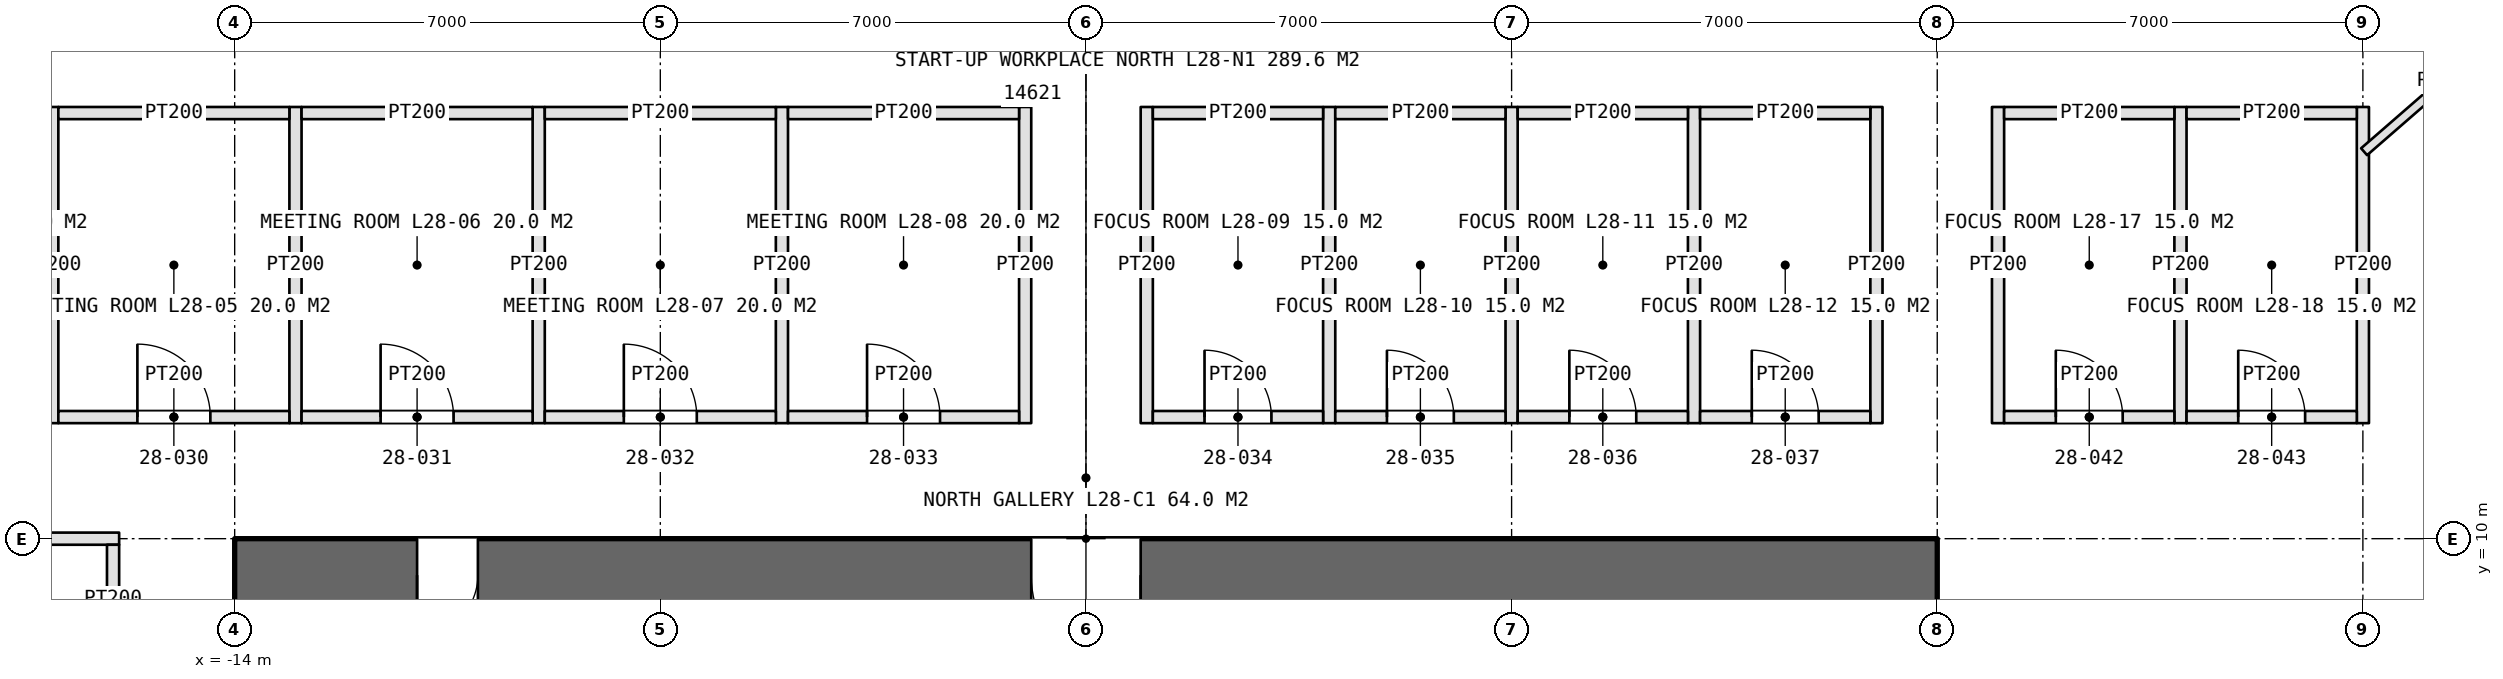
"""IFC4 building model, lengths in metres.
Left out: names, types, materials, properties, quantities, classifications, styles, units other than length and angle.
Written with IfcOpenShell. Run it as: python <this file> out.ifc"""

import sys

from ifc_helpers import new_model, si_unit, direction, frame, frame_2d, origin, place, context, subcontext, project, spatial, rectangle, extrude, element, fill, save


model = new_model("IFC4")
c1 = context("Model", 3, precision=1e-05, world=origin(), true_north=direction((0.0, 1.0)))
c2 = subcontext(c1, "Body", "Model", "MODEL_VIEW")
j1 = project(units=[si_unit("LENGTHUNIT", "METRE"), si_unit("PLANEANGLEUNIT", "RADIAN")], contexts=[c1])
p1 = place(None, origin())
s1 = spatial("IfcSite", under=j1, at=p1, CompositionType="ELEMENT")
p2 = place(p1, origin())
s2 = spatial("IfcBuilding", under=s1, at=p2, CompositionType="ELEMENT")
p3 = place(p2, frame((0.0, 0.0, 134.4)))
s3 = spatial("IfcBuildingStorey", under=s2, at=p3, CompositionType="ELEMENT", Elevation=134.4)
p4 = place(p3, frame((14.0, 9.4, 0.0), z_axis=(0.0, 0.0, 1.0), x_axis=(-1.0, 0.0, 0.0)))
e1 = element("IfcWall", 1, at=p4, inside=s3, PredefinedType="SHEAR", context=c2, shape_type="SweptSolid", body=[
    extrude(rectangle(XDim=28.0, YDim=1.2, at=frame_2d((14.0, 0.0))), origin(), (0.0, 0.0, 1.0), 4.2),
])
p5 = place(p4, frame((24.0, 0.0, 0.0)))
e2 = element("IfcOpeningElement", 2, at=p5, cuts=e1, PredefinedType="OPENING", context=c2, shape_type="SweptSolid", body=[
    extrude(rectangle(XDim=1.0, YDim=2.4, at=frame_2d((0.5, 1.2))), frame((0.0, 0.61, 0.0), z_axis=(0.0, -1.0, 0.0), x_axis=(1.0, 0.0, 0.0)), (0.0, 0.0, 1.0), 1.22),
])
p6 = place(p4, frame((13.1, 0.0, 0.0)))
e3 = element("IfcOpeningElement", 3, at=p6, cuts=e1, PredefinedType="OPENING", context=c2, shape_type="SweptSolid", body=[
    extrude(rectangle(XDim=1.8, YDim=2.4, at=frame_2d((0.9, 1.2))), frame((0.0, 0.61, 0.0), z_axis=(0.0, -1.0, 0.0), x_axis=(1.0, 0.0, 0.0)), (0.0, 0.0, 1.0), 1.22),
])
for number, where, z_axis, x_axis in (
    (4, (-17.0, 11.9, 0.0), (0.0, 0.0, 1.0), (0.0, 1.0, 0.0)),
    (5, (-13.0, 11.9, 0.0), (0.0, 0.0, 1.0), (0.0, 1.0, 0.0)),
    (6, (-9.0, 11.9, 0.0), (0.0, 0.0, 1.0), (0.0, 1.0, 0.0)),
    (7, (-5.0, 11.9, 0.0), (0.0, 0.0, 1.0), (0.0, 1.0, 0.0)),
    (8, (-1.0, 11.9, 0.0), (0.0, 0.0, 1.0), (0.0, 1.0, 0.0)),
):
    element("IfcWall", number, at=place(p3, frame(where, z_axis=z_axis, x_axis=x_axis)), inside=s3, PredefinedType="PARTITIONING", context=c2, shape_type="SweptSolid", body=[
        extrude(rectangle(XDim=5.2, YDim=0.2, at=frame_2d((2.6, 0.0))), origin(), (0.0, 0.0, 1.0), 3.0),
    ])
p7 = place(p3, frame((-16.9, 12.0, 0.0), z_axis=(0.0, 0.0, 1.0), x_axis=(1.0, 0.0, 0.0)))
e9 = element("IfcWall", 9, at=p7, inside=s3, PredefinedType="PARTITIONING", context=c2, shape_type="SweptSolid", body=[
    extrude(rectangle(XDim=3.8, YDim=0.2, at=frame_2d((1.9, 0.0))), origin(), (0.0, 0.0, 1.0), 3.0),
])
p8 = place(p7, frame((1.3, 0.0, 0.0)))
e10 = element("IfcOpeningElement", 10, at=p8, cuts=e9, PredefinedType="OPENING", context=c2, shape_type="SweptSolid", body=[
    extrude(rectangle(XDim=1.2, YDim=2.4, at=frame_2d((0.6, 1.2))), frame((0.0, 0.11, 0.0), z_axis=(0.0, -1.0, 0.0), x_axis=(1.0, 0.0, 0.0)), (0.0, 0.0, 1.0), 0.22),
])
p9 = place(p3, frame((-16.9, 17.0, 0.0), z_axis=(0.0, 0.0, 1.0), x_axis=(1.0, 0.0, 0.0)))
e11 = element("IfcWall", 11, at=p9, inside=s3, PredefinedType="PARTITIONING", context=c2, shape_type="SweptSolid", body=[
    extrude(rectangle(XDim=3.8, YDim=0.2, at=frame_2d((1.9, 0.0))), origin(), (0.0, 0.0, 1.0), 3.0),
])
p10 = place(p3, frame((-12.9, 12.0, 0.0), z_axis=(0.0, 0.0, 1.0), x_axis=(1.0, 0.0, 0.0)))
e12 = element("IfcWall", 12, at=p10, inside=s3, PredefinedType="PARTITIONING", context=c2, shape_type="SweptSolid", body=[
    extrude(rectangle(XDim=3.8, YDim=0.2, at=frame_2d((1.9, 0.0))), origin(), (0.0, 0.0, 1.0), 3.0),
])
p11 = place(p10, frame((1.3, 0.0, 0.0)))
e13 = element("IfcOpeningElement", 13, at=p11, cuts=e12, PredefinedType="OPENING", context=c2, shape_type="SweptSolid", body=[
    extrude(rectangle(XDim=1.2, YDim=2.4, at=frame_2d((0.6, 1.2))), frame((0.0, 0.11, 0.0), z_axis=(0.0, -1.0, 0.0), x_axis=(1.0, 0.0, 0.0)), (0.0, 0.0, 1.0), 0.22),
])
p12 = place(p3, frame((-12.9, 17.0, 0.0), z_axis=(0.0, 0.0, 1.0), x_axis=(1.0, 0.0, 0.0)))
e14 = element("IfcWall", 14, at=p12, inside=s3, PredefinedType="PARTITIONING", context=c2, shape_type="SweptSolid", body=[
    extrude(rectangle(XDim=3.8, YDim=0.2, at=frame_2d((1.9, 0.0))), origin(), (0.0, 0.0, 1.0), 3.0),
])
p13 = place(p3, frame((-8.9, 12.0, 0.0), z_axis=(0.0, 0.0, 1.0), x_axis=(1.0, 0.0, 0.0)))
e15 = element("IfcWall", 15, at=p13, inside=s3, PredefinedType="PARTITIONING", context=c2, shape_type="SweptSolid", body=[
    extrude(rectangle(XDim=3.8, YDim=0.2, at=frame_2d((1.9, 0.0))), origin(), (0.0, 0.0, 1.0), 3.0),
])
p14 = place(p13, frame((1.3, 0.0, 0.0)))
e16 = element("IfcOpeningElement", 16, at=p14, cuts=e15, PredefinedType="OPENING", context=c2, shape_type="SweptSolid", body=[
    extrude(rectangle(XDim=1.2, YDim=2.4, at=frame_2d((0.6, 1.2))), frame((0.0, 0.11, 0.0), z_axis=(0.0, -1.0, 0.0), x_axis=(1.0, 0.0, 0.0)), (0.0, 0.0, 1.0), 0.22),
])
p15 = place(p3, frame((-8.9, 17.0, 0.0), z_axis=(0.0, 0.0, 1.0), x_axis=(1.0, 0.0, 0.0)))
e17 = element("IfcWall", 17, at=p15, inside=s3, PredefinedType="PARTITIONING", context=c2, shape_type="SweptSolid", body=[
    extrude(rectangle(XDim=3.8, YDim=0.2, at=frame_2d((1.9, 0.0))), origin(), (0.0, 0.0, 1.0), 3.0),
])
p16 = place(p3, frame((-4.9, 12.0, 0.0), z_axis=(0.0, 0.0, 1.0), x_axis=(1.0, 0.0, 0.0)))
e18 = element("IfcWall", 18, at=p16, inside=s3, PredefinedType="PARTITIONING", context=c2, shape_type="SweptSolid", body=[
    extrude(rectangle(XDim=3.8, YDim=0.2, at=frame_2d((1.9, 0.0))), origin(), (0.0, 0.0, 1.0), 3.0),
])
p17 = place(p16, frame((1.3, 0.0, 0.0)))
e19 = element("IfcOpeningElement", 19, at=p17, cuts=e18, PredefinedType="OPENING", context=c2, shape_type="SweptSolid", body=[
    extrude(rectangle(XDim=1.2, YDim=2.4, at=frame_2d((0.6, 1.2))), frame((0.0, 0.11, 0.0), z_axis=(0.0, -1.0, 0.0), x_axis=(1.0, 0.0, 0.0)), (0.0, 0.0, 1.0), 0.22),
])
p18 = place(p3, frame((-4.9, 17.0, 0.0), z_axis=(0.0, 0.0, 1.0), x_axis=(1.0, 0.0, 0.0)))
e20 = element("IfcWall", 20, at=p18, inside=s3, PredefinedType="PARTITIONING", context=c2, shape_type="SweptSolid", body=[
    extrude(rectangle(XDim=3.8, YDim=0.2, at=frame_2d((1.9, 0.0))), origin(), (0.0, 0.0, 1.0), 3.0),
])
for number, where, z_axis, x_axis in (
    (21, (1.0, 11.9, 0.0), (0.0, 0.0, 1.0), (0.0, 1.0, 0.0)),
    (22, (4.0, 11.9, 0.0), (0.0, 0.0, 1.0), (0.0, 1.0, 0.0)),
    (23, (7.0, 11.9, 0.0), (0.0, 0.0, 1.0), (0.0, 1.0, 0.0)),
    (24, (10.0, 11.9, 0.0), (0.0, 0.0, 1.0), (0.0, 1.0, 0.0)),
    (25, (13.0, 11.9, 0.0), (0.0, 0.0, 1.0), (0.0, 1.0, 0.0)),
):
    element("IfcWall", number, at=place(p3, frame(where, z_axis=z_axis, x_axis=x_axis)), inside=s3, PredefinedType="PARTITIONING", context=c2, shape_type="SweptSolid", body=[
        extrude(rectangle(XDim=5.2, YDim=0.2, at=frame_2d((2.6, 0.0))), origin(), (0.0, 0.0, 1.0), 3.0),
    ])
p19 = place(p3, frame((1.1, 12.0, 0.0), z_axis=(0.0, 0.0, 1.0), x_axis=(1.0, 0.0, 0.0)))
e26 = element("IfcWall", 26, at=p19, inside=s3, PredefinedType="PARTITIONING", context=c2, shape_type="SweptSolid", body=[
    extrude(rectangle(XDim=2.8, YDim=0.2, at=frame_2d((1.4, 0.0))), origin(), (0.0, 0.0, 1.0), 3.0),
])
p20 = place(p19, frame((0.85, 0.0, 0.0)))
e27 = element("IfcOpeningElement", 27, at=p20, cuts=e26, PredefinedType="OPENING", context=c2, shape_type="SweptSolid", body=[
    extrude(rectangle(XDim=1.1, YDim=2.3, at=frame_2d((0.55, 1.15))), frame((0.0, 0.11, 0.0), z_axis=(0.0, -1.0, 0.0), x_axis=(1.0, 0.0, 0.0)), (0.0, 0.0, 1.0), 0.22),
])
p21 = place(p3, frame((1.1, 17.0, 0.0), z_axis=(0.0, 0.0, 1.0), x_axis=(1.0, 0.0, 0.0)))
e28 = element("IfcWall", 28, at=p21, inside=s3, PredefinedType="PARTITIONING", context=c2, shape_type="SweptSolid", body=[
    extrude(rectangle(XDim=2.8, YDim=0.2, at=frame_2d((1.4, 0.0))), origin(), (0.0, 0.0, 1.0), 3.0),
])
p22 = place(p3, frame((4.1, 12.0, 0.0), z_axis=(0.0, 0.0, 1.0), x_axis=(1.0, 0.0, 0.0)))
e29 = element("IfcWall", 29, at=p22, inside=s3, PredefinedType="PARTITIONING", context=c2, shape_type="SweptSolid", body=[
    extrude(rectangle(XDim=2.8, YDim=0.2, at=frame_2d((1.4, 0.0))), origin(), (0.0, 0.0, 1.0), 3.0),
])
p23 = place(p22, frame((0.85, 0.0, 0.0)))
e30 = element("IfcOpeningElement", 30, at=p23, cuts=e29, PredefinedType="OPENING", context=c2, shape_type="SweptSolid", body=[
    extrude(rectangle(XDim=1.1, YDim=2.3, at=frame_2d((0.55, 1.15))), frame((0.0, 0.11, 0.0), z_axis=(0.0, -1.0, 0.0), x_axis=(1.0, 0.0, 0.0)), (0.0, 0.0, 1.0), 0.22),
])
p24 = place(p3, frame((4.1, 17.0, 0.0), z_axis=(0.0, 0.0, 1.0), x_axis=(1.0, 0.0, 0.0)))
e31 = element("IfcWall", 31, at=p24, inside=s3, PredefinedType="PARTITIONING", context=c2, shape_type="SweptSolid", body=[
    extrude(rectangle(XDim=2.8, YDim=0.2, at=frame_2d((1.4, 0.0))), origin(), (0.0, 0.0, 1.0), 3.0),
])
p25 = place(p3, frame((7.1, 12.0, 0.0), z_axis=(0.0, 0.0, 1.0), x_axis=(1.0, 0.0, 0.0)))
e32 = element("IfcWall", 32, at=p25, inside=s3, PredefinedType="PARTITIONING", context=c2, shape_type="SweptSolid", body=[
    extrude(rectangle(XDim=2.8, YDim=0.2, at=frame_2d((1.4, 0.0))), origin(), (0.0, 0.0, 1.0), 3.0),
])
p26 = place(p25, frame((0.85, 0.0, 0.0)))
e33 = element("IfcOpeningElement", 33, at=p26, cuts=e32, PredefinedType="OPENING", context=c2, shape_type="SweptSolid", body=[
    extrude(rectangle(XDim=1.1, YDim=2.3, at=frame_2d((0.55, 1.15))), frame((0.0, 0.11, 0.0), z_axis=(0.0, -1.0, 0.0), x_axis=(1.0, 0.0, 0.0)), (0.0, 0.0, 1.0), 0.22),
])
p27 = place(p3, frame((7.1, 17.0, 0.0), z_axis=(0.0, 0.0, 1.0), x_axis=(1.0, 0.0, 0.0)))
e34 = element("IfcWall", 34, at=p27, inside=s3, PredefinedType="PARTITIONING", context=c2, shape_type="SweptSolid", body=[
    extrude(rectangle(XDim=2.8, YDim=0.2, at=frame_2d((1.4, 0.0))), origin(), (0.0, 0.0, 1.0), 3.0),
])
p28 = place(p3, frame((10.1, 12.0, 0.0), z_axis=(0.0, 0.0, 1.0), x_axis=(1.0, 0.0, 0.0)))
e35 = element("IfcWall", 35, at=p28, inside=s3, PredefinedType="PARTITIONING", context=c2, shape_type="SweptSolid", body=[
    extrude(rectangle(XDim=2.8, YDim=0.2, at=frame_2d((1.4, 0.0))), origin(), (0.0, 0.0, 1.0), 3.0),
])
p29 = place(p28, frame((0.85, 0.0, 0.0)))
e36 = element("IfcOpeningElement", 36, at=p29, cuts=e35, PredefinedType="OPENING", context=c2, shape_type="SweptSolid", body=[
    extrude(rectangle(XDim=1.1, YDim=2.3, at=frame_2d((0.55, 1.15))), frame((0.0, 0.11, 0.0), z_axis=(0.0, -1.0, 0.0), x_axis=(1.0, 0.0, 0.0)), (0.0, 0.0, 1.0), 0.22),
])
p30 = place(p3, frame((10.1, 17.0, 0.0), z_axis=(0.0, 0.0, 1.0), x_axis=(1.0, 0.0, 0.0)))
e37 = element("IfcWall", 37, at=p30, inside=s3, PredefinedType="PARTITIONING", context=c2, shape_type="SweptSolid", body=[
    extrude(rectangle(XDim=2.8, YDim=0.2, at=frame_2d((1.4, 0.0))), origin(), (0.0, 0.0, 1.0), 3.0),
])
for number, where, z_axis, x_axis in (
    (38, (15.0, 11.9, 0.0), (0.0, 0.0, 1.0), (0.0, 1.0, 0.0)),
    (39, (18.0, 11.9, 0.0), (0.0, 0.0, 1.0), (0.0, 1.0, 0.0)),
    (40, (21.0, 11.9, 0.0), (0.0, 0.0, 1.0), (0.0, 1.0, 0.0)),
):
    element("IfcWall", number, at=place(p3, frame(where, z_axis=z_axis, x_axis=x_axis)), inside=s3, PredefinedType="PARTITIONING", context=c2, shape_type="SweptSolid", body=[
        extrude(rectangle(XDim=5.2, YDim=0.2, at=frame_2d((2.6, 0.0))), origin(), (0.0, 0.0, 1.0), 3.0),
    ])
p31 = place(p3, frame((15.1, 12.0, 0.0), z_axis=(0.0, 0.0, 1.0), x_axis=(1.0, 0.0, 0.0)))
e41 = element("IfcWall", 41, at=p31, inside=s3, PredefinedType="PARTITIONING", context=c2, shape_type="SweptSolid", body=[
    extrude(rectangle(XDim=2.8, YDim=0.2, at=frame_2d((1.4, 0.0))), origin(), (0.0, 0.0, 1.0), 3.0),
])
p32 = place(p31, frame((0.85, 0.0, 0.0)))
e42 = element("IfcOpeningElement", 42, at=p32, cuts=e41, PredefinedType="OPENING", context=c2, shape_type="SweptSolid", body=[
    extrude(rectangle(XDim=1.1, YDim=2.3, at=frame_2d((0.55, 1.15))), frame((0.0, 0.11, 0.0), z_axis=(0.0, -1.0, 0.0), x_axis=(1.0, 0.0, 0.0)), (0.0, 0.0, 1.0), 0.22),
])
p33 = place(p3, frame((15.1, 17.0, 0.0), z_axis=(0.0, 0.0, 1.0), x_axis=(1.0, 0.0, 0.0)))
e43 = element("IfcWall", 43, at=p33, inside=s3, PredefinedType="PARTITIONING", context=c2, shape_type="SweptSolid", body=[
    extrude(rectangle(XDim=2.8, YDim=0.2, at=frame_2d((1.4, 0.0))), origin(), (0.0, 0.0, 1.0), 3.0),
])
p34 = place(p3, frame((18.1, 12.0, 0.0), z_axis=(0.0, 0.0, 1.0), x_axis=(1.0, 0.0, 0.0)))
e44 = element("IfcWall", 44, at=p34, inside=s3, PredefinedType="PARTITIONING", context=c2, shape_type="SweptSolid", body=[
    extrude(rectangle(XDim=2.8, YDim=0.2, at=frame_2d((1.4, 0.0))), origin(), (0.0, 0.0, 1.0), 3.0),
])
p35 = place(p34, frame((0.85, 0.0, 0.0)))
e45 = element("IfcOpeningElement", 45, at=p35, cuts=e44, PredefinedType="OPENING", context=c2, shape_type="SweptSolid", body=[
    extrude(rectangle(XDim=1.1, YDim=2.3, at=frame_2d((0.55, 1.15))), frame((0.0, 0.11, 0.0), z_axis=(0.0, -1.0, 0.0), x_axis=(1.0, 0.0, 0.0)), (0.0, 0.0, 1.0), 0.22),
])
p36 = place(p3, frame((18.1, 17.0, 0.0), z_axis=(0.0, 0.0, 1.0), x_axis=(1.0, 0.0, 0.0)))
e46 = element("IfcWall", 46, at=p36, inside=s3, PredefinedType="PARTITIONING", context=c2, shape_type="SweptSolid", body=[
    extrude(rectangle(XDim=2.8, YDim=0.2, at=frame_2d((1.4, 0.0))), origin(), (0.0, 0.0, 1.0), 3.0),
])
p37 = place(p3, frame((-15.9, 10.0, 0.0), z_axis=(0.0, 0.0, 1.0), x_axis=(-1.0, 0.0, 0.0)))
e47 = element("IfcWall", 47, at=p37, inside=s3, PredefinedType="PARTITIONING", context=c2, shape_type="SweptSolid", body=[
    extrude(rectangle(XDim=5.2, YDim=0.2, at=frame_2d((2.6, 0.0))), origin(), (0.0, 0.0, 1.0), 3.0),
])
p38 = place(p3, frame((-16.0, 6.1, 0.0), z_axis=(0.0, 0.0, 1.0), x_axis=(0.0, 1.0, 0.0)))
e48 = element("IfcWall", 48, at=p38, inside=s3, PredefinedType="PARTITIONING", context=c2, shape_type="SweptSolid", body=[
    extrude(rectangle(XDim=3.8, YDim=0.2, at=frame_2d((1.9, 0.0))), origin(), (0.0, 0.0, 1.0), 3.0),
])
p39 = place(p38, frame((1.35, 0.0, 0.0)))
e49 = element("IfcOpeningElement", 49, at=p39, cuts=e48, PredefinedType="OPENING", context=c2, shape_type="SweptSolid", body=[
    extrude(rectangle(XDim=1.1, YDim=2.3, at=frame_2d((0.55, 1.15))), frame((0.0, 0.11, 0.0), z_axis=(0.0, -1.0, 0.0), x_axis=(1.0, 0.0, 0.0)), (0.0, 0.0, 1.0), 0.22),
])
p40 = place(p3, frame((21.02, 16.364, 0.0), z_axis=(0.0, 0.0, 1.0), x_axis=(0.75467183248, 0.656102450278, 0.0)))
e50 = element("IfcWall", 50, at=p40, inside=s3, PredefinedType="PARTITIONING", context=c2, shape_type="SweptSolid", body=[
    extrude(rectangle(XDim=3.567, YDim=0.15, at=frame_2d((1.783, 0.0))), origin(), (0.0, 0.0, 1.0), 3.0),
])
p41 = place(p5, origin())
e51 = element("IfcDoor", 51, at=p41, inside=s3, OperationType="SINGLE_SWING_RIGHT", PredefinedType="DOOR", context=c2, shape_type="SweptSolid", body=[
    extrude(rectangle(XDim=1.0, YDim=2.4, at=frame_2d((0.5, 1.2))), frame((0.0, 0.025, 0.0), z_axis=(0.0, -1.0, 0.0), x_axis=(1.0, 0.0, 0.0)), (0.0, 0.0, 1.0), 0.05),
])
fill(e2, e51)
p42 = place(p6, origin())
e52 = element("IfcDoor", 52, at=p42, inside=s3, OperationType="DOUBLE_DOOR_SINGLE_SWING", PredefinedType="DOOR", context=c2, shape_type="SweptSolid", body=[
    extrude(rectangle(XDim=1.8, YDim=2.4, at=frame_2d((0.9, 1.2))), frame((0.0, 0.025, 0.0), z_axis=(0.0, -1.0, 0.0), x_axis=(1.0, 0.0, 0.0)), (0.0, 0.0, 1.0), 0.05),
])
fill(e3, e52)
p43 = place(p8, origin())
e53 = element("IfcDoor", 53, at=p43, inside=s3, OperationType="SINGLE_SWING_LEFT", PredefinedType="DOOR", context=c2, shape_type="SweptSolid", body=[
    extrude(rectangle(XDim=1.2, YDim=2.4, at=frame_2d((0.6, 1.2))), frame((0.0, 0.025, 0.0), z_axis=(0.0, -1.0, 0.0), x_axis=(1.0, 0.0, 0.0)), (0.0, 0.0, 1.0), 0.05),
])
fill(e10, e53)
p44 = place(p11, origin())
e54 = element("IfcDoor", 54, at=p44, inside=s3, OperationType="SINGLE_SWING_LEFT", PredefinedType="DOOR", context=c2, shape_type="SweptSolid", body=[
    extrude(rectangle(XDim=1.2, YDim=2.4, at=frame_2d((0.6, 1.2))), frame((0.0, 0.025, 0.0), z_axis=(0.0, -1.0, 0.0), x_axis=(1.0, 0.0, 0.0)), (0.0, 0.0, 1.0), 0.05),
])
fill(e13, e54)
p45 = place(p14, origin())
e55 = element("IfcDoor", 55, at=p45, inside=s3, OperationType="SINGLE_SWING_LEFT", PredefinedType="DOOR", context=c2, shape_type="SweptSolid", body=[
    extrude(rectangle(XDim=1.2, YDim=2.4, at=frame_2d((0.6, 1.2))), frame((0.0, 0.025, 0.0), z_axis=(0.0, -1.0, 0.0), x_axis=(1.0, 0.0, 0.0)), (0.0, 0.0, 1.0), 0.05),
])
fill(e16, e55)
p46 = place(p17, origin())
e56 = element("IfcDoor", 56, at=p46, inside=s3, OperationType="SINGLE_SWING_LEFT", PredefinedType="DOOR", context=c2, shape_type="SweptSolid", body=[
    extrude(rectangle(XDim=1.2, YDim=2.4, at=frame_2d((0.6, 1.2))), frame((0.0, 0.025, 0.0), z_axis=(0.0, -1.0, 0.0), x_axis=(1.0, 0.0, 0.0)), (0.0, 0.0, 1.0), 0.05),
])
fill(e19, e56)
p47 = place(p20, origin())
e57 = element("IfcDoor", 57, at=p47, inside=s3, OperationType="SINGLE_SWING_LEFT", PredefinedType="DOOR", context=c2, shape_type="SweptSolid", body=[
    extrude(rectangle(XDim=1.1, YDim=2.3, at=frame_2d((0.55, 1.15))), frame((0.0, 0.025, 0.0), z_axis=(0.0, -1.0, 0.0), x_axis=(1.0, 0.0, 0.0)), (0.0, 0.0, 1.0), 0.05),
])
fill(e27, e57)
p48 = place(p23, origin())
e58 = element("IfcDoor", 58, at=p48, inside=s3, OperationType="SINGLE_SWING_LEFT", PredefinedType="DOOR", context=c2, shape_type="SweptSolid", body=[
    extrude(rectangle(XDim=1.1, YDim=2.3, at=frame_2d((0.55, 1.15))), frame((0.0, 0.025, 0.0), z_axis=(0.0, -1.0, 0.0), x_axis=(1.0, 0.0, 0.0)), (0.0, 0.0, 1.0), 0.05),
])
fill(e30, e58)
p49 = place(p26, origin())
e59 = element("IfcDoor", 59, at=p49, inside=s3, OperationType="SINGLE_SWING_LEFT", PredefinedType="DOOR", context=c2, shape_type="SweptSolid", body=[
    extrude(rectangle(XDim=1.1, YDim=2.3, at=frame_2d((0.55, 1.15))), frame((0.0, 0.025, 0.0), z_axis=(0.0, -1.0, 0.0), x_axis=(1.0, 0.0, 0.0)), (0.0, 0.0, 1.0), 0.05),
])
fill(e33, e59)
p50 = place(p29, origin())
e60 = element("IfcDoor", 60, at=p50, inside=s3, OperationType="SINGLE_SWING_LEFT", PredefinedType="DOOR", context=c2, shape_type="SweptSolid", body=[
    extrude(rectangle(XDim=1.1, YDim=2.3, at=frame_2d((0.55, 1.15))), frame((0.0, 0.025, 0.0), z_axis=(0.0, -1.0, 0.0), x_axis=(1.0, 0.0, 0.0)), (0.0, 0.0, 1.0), 0.05),
])
fill(e36, e60)
p51 = place(p32, origin())
e61 = element("IfcDoor", 61, at=p51, inside=s3, OperationType="SINGLE_SWING_LEFT", PredefinedType="DOOR", context=c2, shape_type="SweptSolid", body=[
    extrude(rectangle(XDim=1.1, YDim=2.3, at=frame_2d((0.55, 1.15))), frame((0.0, 0.025, 0.0), z_axis=(0.0, -1.0, 0.0), x_axis=(1.0, 0.0, 0.0)), (0.0, 0.0, 1.0), 0.05),
])
fill(e42, e61)
p52 = place(p35, origin())
e62 = element("IfcDoor", 62, at=p52, inside=s3, OperationType="SINGLE_SWING_LEFT", PredefinedType="DOOR", context=c2, shape_type="SweptSolid", body=[
    extrude(rectangle(XDim=1.1, YDim=2.3, at=frame_2d((0.55, 1.15))), frame((0.0, 0.025, 0.0), z_axis=(0.0, -1.0, 0.0), x_axis=(1.0, 0.0, 0.0)), (0.0, 0.0, 1.0), 0.05),
])
fill(e45, e62)
save(model, sys.argv[1])
